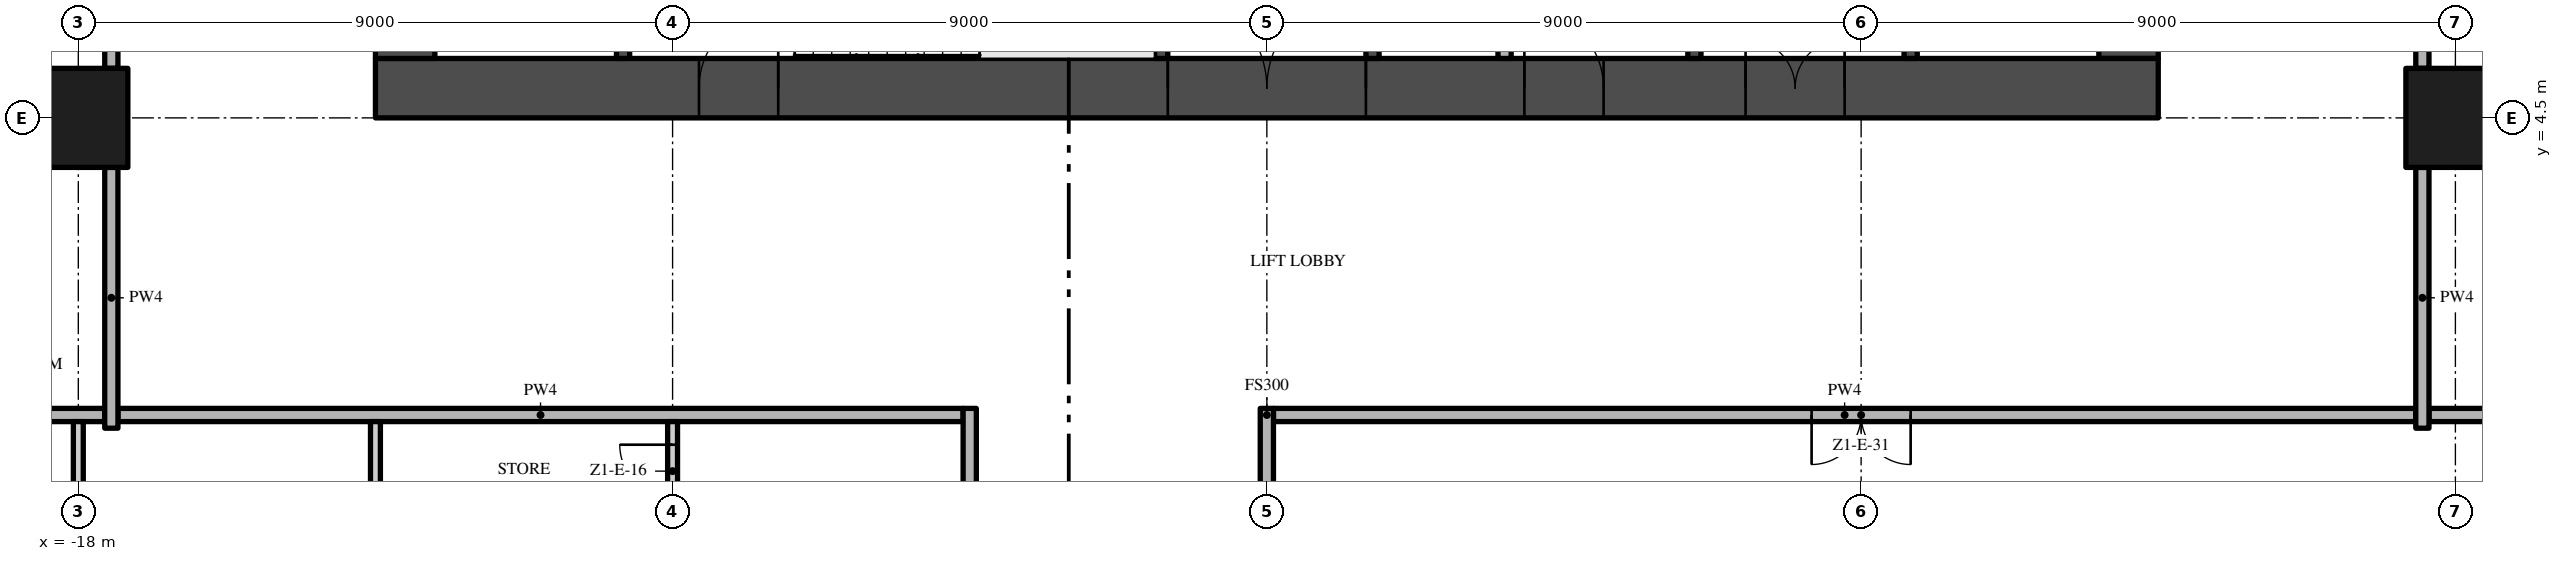
"""IFC4 building model, lengths in metres.
Left out: names, types, materials, properties, quantities, classifications, styles, units other than length and angle.
Written with IfcOpenShell. Run it as: python <this file> out.ifc"""

import sys

from ifc_helpers import new_model, si_unit, direction, frame, frame_2d, origin, origin_2d, place, context, subcontext, project, spatial, rectangle, extrude, element, fill, save


model = new_model("IFC4")
c1 = context("Model", 3, precision=1e-05, world=origin(), true_north=direction((0.0, 1.0)))
c2 = subcontext(c1, "Body", "Model", "MODEL_VIEW")
j1 = project(units=[si_unit("LENGTHUNIT", "METRE"), si_unit("PLANEANGLEUNIT", "RADIAN")], contexts=[c1])
p1 = place(None, origin())
s1 = spatial("IfcSite", under=j1, at=p1, CompositionType="ELEMENT")
p2 = place(p1, origin())
s2 = spatial("IfcBuilding", under=s1, at=p2, CompositionType="ELEMENT")
p3 = place(p2, frame((0.0, 0.0, 56.8)))
s3 = spatial("IfcBuildingStorey", under=s2, at=p3, CompositionType="ELEMENT", Elevation=56.8)
p4 = place(p3, frame((-13.5, 4.95, -0.3), z_axis=(0.0, 0.0, 1.0), x_axis=(1.0, 0.0, 0.0)))
e1 = element("IfcWall", 1, at=p4, inside=s3, PredefinedType="SHEAR", context=c2, shape_type="SweptSolid", body=[
    extrude(rectangle(XDim=27.0, YDim=0.9, at=frame_2d((13.5, 0.0))), origin(), (0.0, 0.0, 1.0), 3.8),
])
p5 = place(p4, frame((12.0, 0.0, 0.3)))
e2 = element("IfcOpeningElement", 2, at=p5, cuts=e1, PredefinedType="OPENING", context=c2, shape_type="SweptSolid", body=[
    extrude(rectangle(XDim=3.0, YDim=2.4, at=frame_2d((1.5, 1.2))), frame((0.0, 0.46, 0.0), z_axis=(0.0, -1.0, 0.0), x_axis=(1.0, 0.0, 0.0)), (0.0, 0.0, 1.0), 0.92),
])
p6 = place(p4, frame((4.9, 0.0, 0.3)))
e3 = element("IfcOpeningElement", 3, at=p6, cuts=e1, PredefinedType="OPENING", context=c2, shape_type="SweptSolid", body=[
    extrude(rectangle(XDim=1.2, YDim=2.2, at=frame_2d((0.6, 1.1))), frame((0.0, 0.46, 0.0), z_axis=(0.0, -1.0, 0.0), x_axis=(1.0, 0.0, 0.0)), (0.0, 0.0, 1.0), 0.92),
])
p7 = place(p4, frame((20.75, 0.0, 0.3)))
e4 = element("IfcOpeningElement", 4, at=p7, cuts=e1, PredefinedType="OPENING", context=c2, shape_type="SweptSolid", body=[
    extrude(rectangle(XDim=1.5, YDim=2.2, at=frame_2d((0.75, 1.1))), frame((0.0, 0.46, 0.0), z_axis=(0.0, -1.0, 0.0), x_axis=(1.0, 0.0, 0.0)), (0.0, 0.0, 1.0), 0.92),
])
p8 = place(p4, frame((17.4, 0.0, 0.3)))
e5 = element("IfcOpeningElement", 5, at=p8, cuts=e1, PredefinedType="OPENING", context=c2, shape_type="SweptSolid", body=[
    extrude(rectangle(XDim=1.2, YDim=2.2, at=frame_2d((0.6, 1.1))), frame((0.0, 0.46, 0.0), z_axis=(0.0, -1.0, 0.0), x_axis=(1.0, 0.0, 0.0)), (0.0, 0.0, 1.0), 0.92),
])
p9 = place(p3, frame((13.05, 5.4, -0.3), z_axis=(0.0, 0.0, 1.0), x_axis=(0.0, 1.0, 0.0)))
e6 = element("IfcWall", 6, at=p9, inside=s3, PredefinedType="SHEAR", context=c2, shape_type="SweptSolid", body=[
    extrude(rectangle(XDim=16.2, YDim=0.9, at=frame_2d((8.1, 0.0))), origin(), (0.0, 0.0, 1.0), 3.8),
])
p10 = place(p9, frame((6.0, 0.0, 0.3)))
e7 = element("IfcOpeningElement", 7, at=p10, cuts=e6, PredefinedType="OPENING", context=c2, shape_type="SweptSolid", body=[
    extrude(rectangle(XDim=1.2, YDim=2.2, at=frame_2d((0.6, 1.1))), frame((0.0, 0.46, 0.0), z_axis=(0.0, -1.0, 0.0), x_axis=(1.0, 0.0, 0.0)), (0.0, 0.0, 1.0), 0.92),
])
p11 = place(p3, frame((-13.05, 21.6, -0.3), z_axis=(0.0, 0.0, 1.0), x_axis=(0.0, -1.0, 0.0)))
e8 = element("IfcWall", 8, at=p11, inside=s3, PredefinedType="SHEAR", context=c2, shape_type="SweptSolid", body=[
    extrude(rectangle(XDim=16.2, YDim=0.9, at=frame_2d((8.1, 0.0))), origin(), (0.0, 0.0, 1.0), 3.8),
])
p12 = place(p11, frame((9.0, 0.0, 0.3)))
e9 = element("IfcOpeningElement", 9, at=p12, cuts=e8, PredefinedType="OPENING", context=c2, shape_type="SweptSolid", body=[
    extrude(rectangle(XDim=1.2, YDim=2.2, at=frame_2d((0.6, 1.1))), frame((0.0, 0.46, 0.0), z_axis=(0.0, -1.0, 0.0), x_axis=(1.0, 0.0, 0.0)), (0.0, 0.0, 1.0), 0.92),
])
for number, where, z_axis, x_axis in (
    (10, (-18.0, 4.5, 0.0), (0.0, 0.0, 1.0), (1.0, 0.0, 0.0)),
    (11, (18.0, 4.5, 0.0), (0.0, 0.0, 1.0), (1.0, 0.0, 0.0)),
):
    element("IfcColumn", number, at=place(p3, frame(where, z_axis=z_axis, x_axis=x_axis)), inside=s3, PredefinedType="COLUMN", context=c2, shape_type="SweptSolid", body=[
        extrude(rectangle(XDim=1.5, YDim=1.5, at=origin_2d()), origin(), (0.0, 0.0, 1.0), 3.5),
    ])
for number, where, z_axis, x_axis in (
    (12, (-9.75, 5.4, 0.0), (0.0, 0.0, 1.0), (0.0, 1.0, 0.0)),
    (13, (-1.6, 5.4, 0.0), (0.0, 0.0, 1.0), (0.0, 1.0, 0.0)),
):
    element("IfcWall", number, at=place(p3, frame(where, z_axis=z_axis, x_axis=x_axis)), inside=s3, PredefinedType="SHEAR", context=c2, shape_type="SweptSolid", body=[
        extrude(rectangle(XDim=2.55, YDim=0.2, at=frame_2d((1.275, 0.0))), origin(), (0.0, 0.0, 1.0), 3.5),
    ])
p13 = place(p3, frame((1.6, 13.5, 0.0), z_axis=(0.0, 0.0, 1.0), x_axis=(0.0, -1.0, 0.0)))
e14 = element("IfcWall", 14, at=p13, inside=s3, PredefinedType="SHEAR", context=c2, shape_type="SweptSolid", body=[
    extrude(rectangle(XDim=8.1, YDim=0.2, at=frame_2d((4.05, 0.0))), origin(), (0.0, 0.0, 1.0), 3.5),
])
p14 = place(p13, frame((3.2, 0.0, 0.0)))
e15 = element("IfcOpeningElement", 15, at=p14, cuts=e14, PredefinedType="OPENING", context=c2, shape_type="SweptSolid", body=[
    extrude(rectangle(XDim=0.9, YDim=2.1, at=frame_2d((0.45, 1.05))), frame((0.0, 0.11, 0.0), z_axis=(0.0, -1.0, 0.0), x_axis=(1.0, 0.0, 0.0)), (0.0, 0.0, 1.0), 0.22),
])
p15 = place(p3, frame((3.6, 13.5, 0.0), z_axis=(0.0, 0.0, 1.0), x_axis=(0.0, -1.0, 0.0)))
e16 = element("IfcWall", 16, at=p15, inside=s3, PredefinedType="PARTITIONING", context=c2, shape_type="SweptSolid", body=[
    extrude(rectangle(XDim=8.1, YDim=0.2, at=frame_2d((4.05, 0.0))), origin(), (0.0, 0.0, 1.0), 3.5),
])
p16 = place(p15, frame((3.6, 0.0, 0.0)))
e17 = element("IfcOpeningElement", 17, at=p16, cuts=e16, PredefinedType="OPENING", context=c2, shape_type="SweptSolid", body=[
    extrude(rectangle(XDim=0.9, YDim=2.1, at=frame_2d((0.45, 1.05))), frame((0.0, 0.11, 0.0), z_axis=(0.0, -1.0, 0.0), x_axis=(1.0, 0.0, 0.0)), (0.0, 0.0, 1.0), 0.22),
])
p17 = place(p3, frame((6.475, 5.4, 0.0), z_axis=(0.0, 0.0, 1.0), x_axis=(0.0, 1.0, 0.0)))
e18 = element("IfcWall", 18, at=p17, inside=s3, PredefinedType="SHEAR", context=c2, shape_type="SweptSolid", body=[
    extrude(rectangle(XDim=6.7, YDim=0.2, at=frame_2d((3.35, 0.0))), origin(), (0.0, 0.0, 1.0), 3.5),
])
p18 = place(p3, frame((9.75, 5.4, 0.0), z_axis=(0.0, 0.0, 1.0), x_axis=(0.0, 1.0, 0.0)))
e19 = element("IfcWall", 19, at=p18, inside=s3, PredefinedType="SHEAR", context=c2, shape_type="SweptSolid", body=[
    extrude(rectangle(XDim=2.2, YDim=0.2, at=frame_2d((1.1, 0.0))), origin(), (0.0, 0.0, 1.0), 3.5),
])
p19 = place(p18, frame((0.55, 0.0, 0.0)))
e20 = element("IfcOpeningElement", 20, at=p19, cuts=e19, PredefinedType="OPENING", context=c2, shape_type="SweptSolid", body=[
    extrude(rectangle(XDim=1.1, YDim=2.1, at=frame_2d((0.55, 1.05))), frame((0.0, 0.11, 0.0), z_axis=(0.0, -1.0, 0.0), x_axis=(1.0, 0.0, 0.0)), (0.0, 0.0, 1.0), 0.22),
])
p20 = place(p3, frame((-17.4, 0.0, 0.0), z_axis=(0.0, 0.0, 1.0), x_axis=(1.0, 0.0, 0.0)))
e21 = element("IfcWall", 21, at=p20, inside=s3, PredefinedType="PARTITIONING", context=c2, shape_type="SweptSolid", body=[
    extrude(rectangle(XDim=12.8, YDim=0.2, at=frame_2d((6.4, 0.0))), origin(), (0.0, 0.0, 1.0), 3.5),
])
p21 = place(p3, frame((17.4, 0.0, 0.0), z_axis=(0.0, 0.0, 1.0), x_axis=(-1.0, 0.0, 0.0)))
e22 = element("IfcWall", 22, at=p21, inside=s3, PredefinedType="PARTITIONING", context=c2, shape_type="SweptSolid", body=[
    extrude(rectangle(XDim=17.3, YDim=0.2, at=frame_2d((8.65, 0.0))), origin(), (0.0, 0.0, 1.0), 3.5),
])
p22 = place(p21, frame((7.65, 0.0, 0.0)))
e23 = element("IfcOpeningElement", 23, at=p22, cuts=e22, PredefinedType="OPENING", context=c2, shape_type="SweptSolid", body=[
    extrude(rectangle(XDim=1.5, YDim=2.4, at=frame_2d((0.75, 1.2))), frame((0.0, 0.11, 0.0), z_axis=(0.0, -1.0, 0.0), x_axis=(1.0, 0.0, 0.0)), (0.0, 0.0, 1.0), 0.22),
])
for number, where, z_axis, x_axis in (
    (24, (-26.7, 0.0, 0.0), (0.0, 0.0, 1.0), (1.0, 0.0, 0.0)),
    (25, (17.6, 0.0, 0.0), (0.0, 0.0, 1.0), (1.0, 0.0, 0.0)),
):
    element("IfcWall", number, at=place(p3, frame(where, z_axis=z_axis, x_axis=x_axis)), inside=s3, PredefinedType="PARTITIONING", context=c2, shape_type="SweptSolid", body=[
        extrude(rectangle(XDim=9.1, YDim=0.2, at=frame_2d((4.55, 0.0))), origin(), (0.0, 0.0, 1.0), 3.5),
    ])
p23 = place(p3, frame((-18.0, -3.75, 0.0), z_axis=(0.0, 0.0, 1.0), x_axis=(0.0, 1.0, 0.0)))
e26 = element("IfcWall", 26, at=p23, inside=s3, PredefinedType="PARTITIONING", context=c2, shape_type="SweptSolid", body=[
    extrude(rectangle(XDim=3.65, YDim=0.15, at=frame_2d((1.825, 0.0))), origin(), (0.0, 0.0, 1.0), 3.5),
])
p24 = place(p23, frame((0.15, 0.0, 0.0)))
e27 = element("IfcOpeningElement", 27, at=p24, cuts=e26, PredefinedType="OPENING", context=c2, shape_type="SweptSolid", body=[
    extrude(rectangle(XDim=1.0, YDim=2.4, at=frame_2d((0.5, 1.2))), frame((0.0, 0.085, 0.0), z_axis=(0.0, -1.0, 0.0), x_axis=(1.0, 0.0, 0.0)), (0.0, 0.0, 1.0), 0.17),
])
p25 = place(p3, frame((-17.5, -0.2, 0.0), z_axis=(0.0, 0.0, 1.0), x_axis=(0.0, 1.0, 0.0)))
e28 = element("IfcWall", 28, at=p25, inside=s3, PredefinedType="PARTITIONING", context=c2, shape_type="SweptSolid", body=[
    extrude(rectangle(XDim=3.95, YDim=0.2, at=frame_2d((1.975, 0.0))), origin(), (0.0, 0.0, 1.0), 3.5),
])
p26 = place(p3, frame((-17.5, 5.25, 0.0), z_axis=(0.0, 0.0, 1.0), x_axis=(0.0, 1.0, 0.0)))
e29 = element("IfcWall", 29, at=p26, inside=s3, PredefinedType="PARTITIONING", context=c2, shape_type="SweptSolid", body=[
    extrude(rectangle(XDim=7.5, YDim=0.2, at=frame_2d((3.75, 0.0))), origin(), (0.0, 0.0, 1.0), 3.5),
])
p27 = place(p3, frame((-13.5, -9.975, 0.0), z_axis=(0.0, 0.0, 1.0), x_axis=(0.0, 1.0, 0.0)))
e30 = element("IfcWall", 30, at=p27, inside=s3, PredefinedType="PARTITIONING", context=c2, shape_type="SweptSolid", body=[
    extrude(rectangle(XDim=9.875, YDim=0.15, at=frame_2d((4.938, 0.0))), origin(), (0.0, 0.0, 1.0), 3.5),
])
p28 = place(p3, frame((-9.0, -3.75, 0.0), z_axis=(0.0, 0.0, 1.0), x_axis=(0.0, 1.0, 0.0)))
e31 = element("IfcWall", 31, at=p28, inside=s3, PredefinedType="PARTITIONING", context=c2, shape_type="SweptSolid", body=[
    extrude(rectangle(XDim=3.65, YDim=0.15, at=frame_2d((1.825, 0.0))), origin(), (0.0, 0.0, 1.0), 3.5),
])
p29 = place(p28, frame((2.5, 0.0, 0.0)))
e32 = element("IfcOpeningElement", 32, at=p29, cuts=e31, PredefinedType="OPENING", context=c2, shape_type="SweptSolid", body=[
    extrude(rectangle(XDim=0.8, YDim=2.0, at=frame_2d((0.4, 1.0))), frame((0.0, 0.085, 0.0), z_axis=(0.0, -1.0, 0.0), x_axis=(1.0, 0.0, 0.0)), (0.0, 0.0, 1.0), 0.17),
])
p30 = place(p3, frame((-4.5, -22.2, 0.0), z_axis=(0.0, 0.0, 1.0), x_axis=(0.0, 1.0, 0.0)))
e33 = element("IfcWall", 33, at=p30, inside=s3, PredefinedType="PARTITIONING", context=c2, shape_type="SweptSolid", body=[
    extrude(rectangle(XDim=22.3, YDim=0.2, at=frame_2d((11.15, 0.0))), origin(), (0.0, 0.0, 1.0), 3.5),
])
p31 = place(p30, frame((10.2, 0.0, 0.0)))
e34 = element("IfcOpeningElement", 34, at=p31, cuts=e33, PredefinedType="OPENING", context=c2, shape_type="SweptSolid", body=[
    extrude(rectangle(XDim=1.5, YDim=2.4, at=frame_2d((0.75, 1.2))), frame((0.0, 0.11, 0.0), z_axis=(0.0, -1.0, 0.0), x_axis=(1.0, 0.0, 0.0)), (0.0, 0.0, 1.0), 0.22),
])
p32 = place(p3, frame((0.0, -3.75, 0.0), z_axis=(0.0, 0.0, 1.0), x_axis=(0.0, 1.0, 0.0)))
e35 = element("IfcWall", 35, at=p32, inside=s3, PredefinedType="PARTITIONING", context=c2, shape_type="SweptSolid", body=[
    extrude(rectangle(XDim=3.85, YDim=0.2, at=frame_2d((1.925, 0.0))), origin(), (0.0, 0.0, 1.0), 3.5),
])
p33 = place(p3, frame((17.5, -0.2, 0.0), z_axis=(0.0, 0.0, 1.0), x_axis=(0.0, 1.0, 0.0)))
e36 = element("IfcWall", 36, at=p33, inside=s3, PredefinedType="PARTITIONING", context=c2, shape_type="SweptSolid", body=[
    extrude(rectangle(XDim=3.95, YDim=0.2, at=frame_2d((1.975, 0.0))), origin(), (0.0, 0.0, 1.0), 3.5),
])
p34 = place(p3, frame((17.5, 12.75, 0.0), z_axis=(0.0, 0.0, 1.0), x_axis=(0.0, -1.0, 0.0)))
e37 = element("IfcWall", 37, at=p34, inside=s3, PredefinedType="PARTITIONING", context=c2, shape_type="SweptSolid", body=[
    extrude(rectangle(XDim=7.5, YDim=0.2, at=frame_2d((3.75, 0.0))), origin(), (0.0, 0.0, 1.0), 3.5),
])
p35 = place(p34, frame((5.4, 0.0, 0.0)))
e38 = element("IfcOpeningElement", 38, at=p35, cuts=e37, PredefinedType="OPENING", context=c2, shape_type="SweptSolid", body=[
    extrude(rectangle(XDim=1.2, YDim=2.4, at=frame_2d((0.6, 1.2))), frame((0.0, 0.11, 0.0), z_axis=(0.0, -1.0, 0.0), x_axis=(1.0, 0.0, 0.0)), (0.0, 0.0, 1.0), 0.22),
])
p36 = place(p5, frame((3.0, 0.0, 0.0), z_axis=(0.0, 0.0, 1.0), x_axis=(-1.0, 0.0, 0.0)))
e39 = element("IfcDoor", 39, at=p36, inside=s3, OperationType="DOUBLE_DOOR_SINGLE_SWING", PredefinedType="DOOR", context=c2, shape_type="SweptSolid", body=[
    extrude(rectangle(XDim=3.0, YDim=2.4, at=frame_2d((1.5, 1.2))), frame((0.0, 0.025, 0.0), z_axis=(0.0, -1.0, 0.0), x_axis=(1.0, 0.0, 0.0)), (0.0, 0.0, 1.0), 0.05),
])
fill(e2, e39)
p37 = place(p6, frame((1.2, 0.0, 0.0), z_axis=(0.0, 0.0, 1.0), x_axis=(-1.0, 0.0, 0.0)))
e40 = element("IfcDoor", 40, at=p37, inside=s3, OperationType="SINGLE_SWING_LEFT", PredefinedType="DOOR", context=c2, shape_type="SweptSolid", body=[
    extrude(rectangle(XDim=1.2, YDim=2.2, at=frame_2d((0.6, 1.1))), frame((0.0, 0.025, 0.0), z_axis=(0.0, -1.0, 0.0), x_axis=(1.0, 0.0, 0.0)), (0.0, 0.0, 1.0), 0.05),
])
fill(e3, e40)
p38 = place(p7, frame((1.5, 0.0, 0.0), z_axis=(0.0, 0.0, 1.0), x_axis=(-1.0, 0.0, 0.0)))
e41 = element("IfcDoor", 41, at=p38, inside=s3, OperationType="DOUBLE_DOOR_SINGLE_SWING", PredefinedType="DOOR", context=c2, shape_type="SweptSolid", body=[
    extrude(rectangle(XDim=1.5, YDim=2.2, at=frame_2d((0.75, 1.1))), frame((0.0, 0.025, 0.0), z_axis=(0.0, -1.0, 0.0), x_axis=(1.0, 0.0, 0.0)), (0.0, 0.0, 1.0), 0.05),
])
fill(e4, e41)
p39 = place(p8, frame((1.2, 0.0, 0.0), z_axis=(0.0, 0.0, 1.0), x_axis=(-1.0, 0.0, 0.0)))
e42 = element("IfcDoor", 42, at=p39, inside=s3, OperationType="SINGLE_SWING_RIGHT", PredefinedType="DOOR", context=c2, shape_type="SweptSolid", body=[
    extrude(rectangle(XDim=1.2, YDim=2.2, at=frame_2d((0.6, 1.1))), frame((0.0, 0.025, 0.0), z_axis=(0.0, -1.0, 0.0), x_axis=(1.0, 0.0, 0.0)), (0.0, 0.0, 1.0), 0.05),
])
fill(e5, e42)
p40 = place(p29, origin())
e43 = element("IfcDoor", 43, at=p40, inside=s3, OperationType="SINGLE_SWING_RIGHT", PredefinedType="DOOR", context=c2, shape_type="SweptSolid", body=[
    extrude(rectangle(XDim=0.8, YDim=2.0, at=frame_2d((0.4, 1.0))), frame((0.0, 0.025, 0.0), z_axis=(0.0, -1.0, 0.0), x_axis=(1.0, 0.0, 0.0)), (0.0, 0.0, 1.0), 0.05),
])
fill(e32, e43)
p41 = place(p22, origin())
e44 = element("IfcDoor", 44, at=p41, inside=s3, OperationType="DOUBLE_DOOR_SINGLE_SWING", PredefinedType="DOOR", context=c2, shape_type="SweptSolid", body=[
    extrude(rectangle(XDim=1.5, YDim=2.4, at=frame_2d((0.75, 1.2))), frame((0.0, 0.025, 0.0), z_axis=(0.0, -1.0, 0.0), x_axis=(1.0, 0.0, 0.0)), (0.0, 0.0, 1.0), 0.05),
])
fill(e23, e44)
save(model, sys.argv[1])
